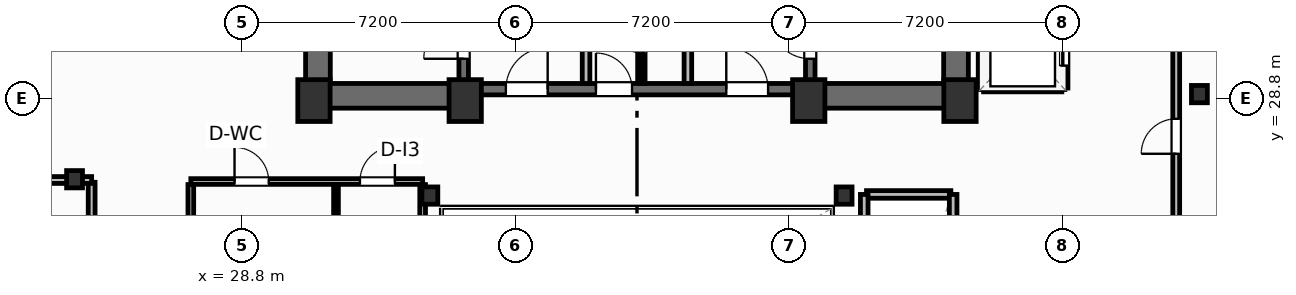
"""IFC4 building model, lengths in metres.
Left out: names, types, materials, properties, quantities, classifications, styles, units other than length and angle.
Written with IfcOpenShell. Run it as: python <this file> out.ifc"""

import sys

from ifc_helpers import new_model, si_unit, direction, frame, frame_2d, origin, origin_2d, place, context, subcontext, project, spatial, rectangle, i_section, extrude, element, fill, save


model = new_model("IFC4")
c1 = context("Model", 3, precision=1e-05, world=origin(), true_north=direction((0.0, 1.0)))
c2 = subcontext(c1, "Body", "Model", "MODEL_VIEW")
j1 = project(units=[si_unit("LENGTHUNIT", "METRE"), si_unit("PLANEANGLEUNIT", "RADIAN")], contexts=[c1])
p1 = place(None, origin())
s1 = spatial("IfcSite", under=j1, at=p1, CompositionType="ELEMENT")
p2 = place(p1, origin())
s2 = spatial("IfcBuilding", under=s1, at=p2, CompositionType="ELEMENT")
p3 = place(p2, frame((0.0, 0.0, 185.7)))
s3 = spatial("IfcBuildingStorey", under=s2, at=p3, CompositionType="ELEMENT", Elevation=185.7)
for number, where, z_axis, x_axis in (
    (1, (30.7, 28.75, 0.0), (0.0, 0.0, 1.0), (1.0, 0.0, 0.0)),
    (2, (34.68, 28.75, 0.0), (0.0, 0.0, 1.0), (1.0, 0.0, 0.0)),
    (3, (43.72, 28.75, 0.0), (0.0, 0.0, 1.0), (1.0, 0.0, 0.0)),
    (4, (47.7, 28.75, 0.0), (0.0, 0.0, 1.0), (1.0, 0.0, 0.0)),
):
    element("IfcColumn", number, at=place(p3, frame(where, z_axis=z_axis, x_axis=x_axis)), inside=s3, PredefinedType="COLUMN", context=c2, shape_type="SweptSolid", body=[
        extrude(rectangle(XDim=0.85, YDim=1.1, at=origin_2d()), origin(), (0.0, 0.0, 1.0), 3.7),
    ])
for number, where, z_axis, x_axis in (
    (5, (33.75, 26.25, 0.0), (0.0, 0.0, 1.0), (1.0, 0.0, 0.0)),
    (6, (44.65, 26.25, 0.0), (0.0, 0.0, 1.0), (1.0, 0.0, 0.0)),
    (7, (24.4, 26.68, 0.0), (0.0, 0.0, 1.0), (1.0, 0.0, 0.0)),
    (8, (54.0, 28.92, 0.0), (0.0, 0.0, 1.0), (1.0, 0.0, 0.0)),
):
    element("IfcColumn", number, at=place(p3, frame(where, z_axis=z_axis, x_axis=x_axis)), inside=s3, PredefinedType="COLUMN", context=c2, shape_type="SweptSolid", body=[
        extrude(i_section(OverallWidth=0.418, OverallDepth=0.455, WebThickness=0.042, FlangeThickness=0.068, FilletRadius=0.025, at=origin_2d()), origin(), (0.0, 0.0, 1.0), 3.7),
    ])
for number, where, z_axis, x_axis in (
    (9, (30.805, 29.2, 0.0), (0.0, 0.0, 1.0), (0.0, 1.0, 0.0)),
    (10, (47.595, 29.2, 0.0), (0.0, 0.0, 1.0), (0.0, 1.0, 0.0)),
):
    element("IfcWall", number, at=place(p3, frame(where, z_axis=z_axis, x_axis=x_axis)), inside=s3, PredefinedType="SHEAR", context=c2, shape_type="SweptSolid", body=[
        extrude(rectangle(XDim=9.22, YDim=0.65, at=frame_2d((4.61, 0.0))), origin(), (0.0, 0.0, 1.0), 3.45),
    ])
p4 = place(p3, frame((30.48, 28.875, 0.0), z_axis=(0.0, 0.0, 1.0), x_axis=(1.0, 0.0, 0.0)))
e11 = element("IfcWall", 11, at=p4, inside=s3, PredefinedType="SHEAR", context=c2, shape_type="SweptSolid", body=[
    extrude(rectangle(XDim=4.32, YDim=0.65, at=frame_2d((2.16, 0.0))), origin(), (0.0, 0.0, 1.0), 3.45),
])
p5 = place(p3, frame((43.6, 28.875, 0.0), z_axis=(0.0, 0.0, 1.0), x_axis=(1.0, 0.0, 0.0)))
e12 = element("IfcWall", 12, at=p5, inside=s3, PredefinedType="SHEAR", context=c2, shape_type="SweptSolid", body=[
    extrude(rectangle(XDim=4.32, YDim=0.65, at=frame_2d((2.16, 0.0))), origin(), (0.0, 0.0, 1.0), 3.45),
])
p6 = place(p3, frame((34.8, 29.05, 0.0), z_axis=(0.0, 0.0, 1.0), x_axis=(1.0, 0.0, 0.0)))
e13 = element("IfcWall", 13, at=p6, inside=s3, PredefinedType="SHEAR", context=c2, shape_type="SweptSolid", body=[
    extrude(rectangle(XDim=8.8, YDim=0.3, at=frame_2d((4.4, 0.0))), origin(), (0.0, 0.0, 1.0), 3.45),
])
p7 = place(p6, frame((0.95, 0.0, 0.0)))
e14 = element("IfcOpeningElement", 14, at=p7, cuts=e13, PredefinedType="OPENING", context=c2, shape_type="SweptSolid", body=[
    extrude(rectangle(XDim=1.1, YDim=2.15, at=frame_2d((0.55, 1.075))), frame((0.0, 0.16, 0.0), z_axis=(0.0, -1.0, 0.0), x_axis=(1.0, 0.0, 0.0)), (0.0, 0.0, 1.0), 0.32),
])
p8 = place(p6, frame((6.75, 0.0, 0.0)))
e15 = element("IfcOpeningElement", 15, at=p8, cuts=e13, PredefinedType="OPENING", context=c2, shape_type="SweptSolid", body=[
    extrude(rectangle(XDim=1.1, YDim=2.15, at=frame_2d((0.55, 1.075))), frame((0.0, 0.16, 0.0), z_axis=(0.0, -1.0, 0.0), x_axis=(1.0, 0.0, 0.0)), (0.0, 0.0, 1.0), 0.32),
])
p9 = place(p6, frame((3.32, 0.0, 0.0)))
e16 = element("IfcOpeningElement", 16, at=p9, cuts=e13, PredefinedType="OPENING", context=c2, shape_type="SweptSolid", body=[
    extrude(rectangle(XDim=0.95, YDim=2.15, at=frame_2d((0.475, 1.075))), frame((0.0, 0.16, 0.0), z_axis=(0.0, -1.0, 0.0), x_axis=(1.0, 0.0, 0.0)), (0.0, 0.0, 1.0), 0.32),
])
p10 = place(p3, frame((34.64, 29.2, 0.0), z_axis=(0.0, 0.0, 1.0), x_axis=(0.0, 1.0, 0.0)))
e17 = element("IfcWall", 17, at=p10, inside=s3, PredefinedType="SHEAR", context=c2, shape_type="SweptSolid", body=[
    extrude(rectangle(XDim=9.22, YDim=0.25, at=frame_2d((4.61, 0.0))), origin(), (0.0, 0.0, 1.0), 3.45),
])
p11 = place(p10, frame((0.65, 0.0, 0.0)))
e18 = element("IfcOpeningElement", 18, at=p11, cuts=e17, PredefinedType="OPENING", context=c2, shape_type="SweptSolid", body=[
    extrude(rectangle(XDim=1.05, YDim=2.15, at=frame_2d((0.525, 1.075))), frame((0.0, 0.135, 0.0), z_axis=(0.0, -1.0, 0.0), x_axis=(1.0, 0.0, 0.0)), (0.0, 0.0, 1.0), 0.27),
])
p12 = place(p3, frame((43.76, 29.2, 0.0), z_axis=(0.0, 0.0, 1.0), x_axis=(0.0, 1.0, 0.0)))
e19 = element("IfcWall", 19, at=p12, inside=s3, PredefinedType="SHEAR", context=c2, shape_type="SweptSolid", body=[
    extrude(rectangle(XDim=9.22, YDim=0.25, at=frame_2d((4.61, 0.0))), origin(), (0.0, 0.0, 1.0), 3.45),
])
p13 = place(p12, frame((0.65, 0.0, 0.0)))
e20 = element("IfcOpeningElement", 20, at=p13, cuts=e19, PredefinedType="OPENING", context=c2, shape_type="SweptSolid", body=[
    extrude(rectangle(XDim=1.05, YDim=2.15, at=frame_2d((0.525, 1.075))), frame((0.0, 0.135, 0.0), z_axis=(0.0, -1.0, 0.0), x_axis=(1.0, 0.0, 0.0)), (0.0, 0.0, 1.0), 0.27),
])
p14 = place(p3, frame((24.85, 23.03, 0.0), z_axis=(0.0, 0.0, 1.0), x_axis=(0.0, 1.0, 0.0)))
e21 = element("IfcWall", 21, at=p14, inside=s3, PredefinedType="PARTITIONING", context=c2, shape_type="SweptSolid", body=[
    extrude(rectangle(XDim=3.57, YDim=0.18, at=frame_2d((1.785, 0.0))), origin(), (0.0, 0.0, 1.0), 3.45),
])
p15 = place(p14, frame((1.5, 0.0, 0.0)))
e22 = element("IfcOpeningElement", 22, at=p15, cuts=e21, PredefinedType="OPENING", context=c2, shape_type="SweptSolid", body=[
    extrude(rectangle(XDim=0.92, YDim=2.05, at=frame_2d((0.46, 1.025))), frame((0.0, 0.1, 0.0), z_axis=(0.0, -1.0, 0.0), x_axis=(1.0, 0.0, 0.0)), (0.0, 0.0, 1.0), 0.2),
])
p16 = place(p3, frame((3.658, 26.66, 0.0), z_axis=(0.0, 0.0, 1.0), x_axis=(1.0, 0.0, 0.0)))
e23 = element("IfcWall", 23, at=p16, inside=s3, PredefinedType="PARTITIONING", context=c2, shape_type="SweptSolid", body=[
    extrude(rectangle(XDim=21.192, YDim=0.18, at=frame_2d((10.596, 0.0))), origin(), (0.0, 0.0, 1.0), 2.662),
])
p17 = place(p3, frame((53.39, 19.28, 0.0), z_axis=(0.0, 0.0, 1.0), x_axis=(0.0, 1.0, 0.0)))
e24 = element("IfcWall", 24, at=p17, inside=s3, PredefinedType="PARTITIONING", context=c2, shape_type="SweptSolid", body=[
    extrude(rectangle(XDim=20.02, YDim=0.18, at=frame_2d((10.01, 0.0))), origin(), (0.0, 0.0, 1.0), 3.45),
])
p18 = place(p17, frame((8.07, 0.0, 0.0)))
e25 = element("IfcOpeningElement", 25, at=p18, cuts=e24, PredefinedType="OPENING", context=c2, shape_type="SweptSolid", body=[
    extrude(rectangle(XDim=0.92, YDim=2.05, at=frame_2d((0.46, 1.025))), frame((0.0, 0.1, 0.0), z_axis=(0.0, -1.0, 0.0), x_axis=(1.0, 0.0, 0.0)), (0.0, 0.0, 1.0), 0.2),
])
for number, where, z_axis, x_axis in (
    (26, (37.86, 29.2, 0.0), (0.0, 0.0, 1.0), (0.0, 1.0, 0.0)),
    (27, (40.54, 29.2, 0.0), (0.0, 0.0, 1.0), (0.0, 1.0, 0.0)),
):
    element("IfcWall", number, at=place(p3, frame(where, z_axis=z_axis, x_axis=x_axis)), inside=s3, PredefinedType="PARTITIONING", context=c2, shape_type="SweptSolid", body=[
        extrude(rectangle(XDim=5.18, YDim=0.2, at=frame_2d((2.59, 0.0))), origin(), (0.0, 0.0, 1.0), 3.45),
    ])
p19 = place(p3, frame((39.35, 29.2, 0.0), z_axis=(0.0, 0.0, 1.0), x_axis=(0.0, 1.0, 0.0)))
e28 = element("IfcWall", 28, at=p19, inside=s3, PredefinedType="PARTITIONING", context=c2, shape_type="SweptSolid", body=[
    extrude(rectangle(XDim=5.22, YDim=0.125, at=frame_2d((2.61, 0.0))), origin(), (0.0, 0.0, 1.0), 3.45),
])
p20 = place(p19, frame((0.8, 0.0, 0.0)))
e29 = element("IfcOpeningElement", 29, at=p20, cuts=e28, PredefinedType="OPENING", context=c2, shape_type="SweptSolid", body=[
    extrude(rectangle(XDim=0.85, YDim=2.05, at=frame_2d((0.425, 1.025))), frame((0.0, 0.073, 0.0), z_axis=(0.0, -1.0, 0.0), x_axis=(1.0, 0.0, 0.0)), (0.0, 0.0, 1.0), 0.145),
])
p21 = place(p19, frame((3.4, 0.0, 0.0)))
e30 = element("IfcOpeningElement", 30, at=p21, cuts=e28, PredefinedType="OPENING", context=c2, shape_type="SweptSolid", body=[
    extrude(rectangle(XDim=0.85, YDim=2.05, at=frame_2d((0.425, 1.025))), frame((0.0, 0.073, 0.0), z_axis=(0.0, -1.0, 0.0), x_axis=(1.0, 0.0, 0.0)), (0.0, 0.0, 1.0), 0.145),
])
p22 = place(p3, frame((27.46, 26.62, 0.0), z_axis=(0.0, 0.0, 1.0), x_axis=(1.0, 0.0, 0.0)))
e31 = element("IfcWall", 31, at=p22, inside=s3, PredefinedType="PARTITIONING", context=c2, shape_type="SweptSolid", body=[
    extrude(rectangle(XDim=6.1, YDim=0.15, at=frame_2d((3.05, 0.0))), origin(), (0.0, 0.0, 1.0), 2.662),
])
p23 = place(p22, frame((1.15, 0.0, 0.0)))
e32 = element("IfcOpeningElement", 32, at=p23, cuts=e31, PredefinedType="OPENING", context=c2, shape_type="SweptSolid", body=[
    extrude(rectangle(XDim=0.9, YDim=2.05, at=frame_2d((0.45, 1.025))), frame((0.0, 0.085, 0.0), z_axis=(0.0, -1.0, 0.0), x_axis=(1.0, 0.0, 0.0)), (0.0, 0.0, 1.0), 0.17),
])
p24 = place(p22, frame((4.45, 0.0, 0.0)))
e33 = element("IfcOpeningElement", 33, at=p24, cuts=e31, PredefinedType="OPENING", context=c2, shape_type="SweptSolid", body=[
    extrude(rectangle(XDim=0.92, YDim=2.05, at=frame_2d((0.46, 1.025))), frame((0.0, 0.085, 0.0), z_axis=(0.0, -1.0, 0.0), x_axis=(1.0, 0.0, 0.0)), (0.0, 0.0, 1.0), 0.17),
])
p25 = place(p3, frame((31.28, 19.38, 0.0), z_axis=(0.0, 0.0, 1.0), x_axis=(0.0, 1.0, 0.0)))
e34 = element("IfcWall", 34, at=p25, inside=s3, PredefinedType="PARTITIONING", context=c2, shape_type="SweptSolid", body=[
    extrude(rectangle(XDim=7.16, YDim=0.125, at=frame_2d((3.58, 0.0))), origin(), (0.0, 0.0, 1.0), 3.45),
])
p26 = place(p3, frame((27.46, 19.38, 0.0), z_axis=(0.0, 0.0, 1.0), x_axis=(0.0, 1.0, 0.0)))
e35 = element("IfcWall", 35, at=p26, inside=s3, PredefinedType="PARTITIONING", context=c2, shape_type="SweptSolid", body=[
    extrude(rectangle(XDim=7.16, YDim=0.15, at=frame_2d((3.58, 0.0))), origin(), (0.0, 0.0, 1.0), 3.45),
])
p27 = place(p26, frame((1.4, 0.0, 0.0)))
e36 = element("IfcOpeningElement", 36, at=p27, cuts=e35, PredefinedType="OPENING", context=c2, shape_type="SweptSolid", body=[
    extrude(rectangle(XDim=0.95, YDim=2.05, at=frame_2d((0.475, 1.025))), frame((0.0, 0.085, 0.0), z_axis=(0.0, -1.0, 0.0), x_axis=(1.0, 0.0, 0.0)), (0.0, 0.0, 1.0), 0.17),
])
p28 = place(p3, frame((33.56, 19.38, 0.0), z_axis=(0.0, 0.0, 1.0), x_axis=(0.0, 1.0, 0.0)))
e37 = element("IfcWall", 37, at=p28, inside=s3, PredefinedType="PARTITIONING", context=c2, shape_type="SweptSolid", body=[
    extrude(rectangle(XDim=7.16, YDim=0.15, at=frame_2d((3.58, 0.0))), origin(), (0.0, 0.0, 1.0), 2.824),
])
p29 = place(p3, frame((48.32, 29.08, 0.0), z_axis=(0.0, 0.0, 1.0), x_axis=(1.0, 0.0, 0.0)))
e38 = element("IfcWall", 38, at=p29, inside=s3, PredefinedType="PARTITIONING", context=c2, shape_type="SweptSolid", body=[
    extrude(rectangle(XDim=2.06, YDim=0.2, at=frame_2d((1.03, 0.0))), origin(), (0.0, 0.0, 1.0), 2.662),
])
p30 = place(p3, frame((48.28, 29.08, 0.0), z_axis=(0.0, 0.0, 1.0), x_axis=(0.0, 1.0, 0.0)))
e39 = element("IfcWall", 39, at=p30, inside=s3, PredefinedType="PARTITIONING", context=c2, shape_type="SweptSolid", body=[
    extrude(rectangle(XDim=6.89, YDim=0.2, at=frame_2d((3.445, 0.0))), origin(), (0.0, 0.0, 1.0), 3.45),
])
p31 = place(p3, frame((50.44, 29.08, 0.0), z_axis=(0.0, 0.0, 1.0), x_axis=(0.0, 1.0, 0.0)))
e40 = element("IfcWall", 40, at=p31, inside=s3, PredefinedType="PARTITIONING", context=c2, shape_type="SweptSolid", body=[
    extrude(rectangle(XDim=6.89, YDim=0.2, at=frame_2d((3.445, 0.0))), origin(), (0.0, 0.0, 1.0), 3.45),
])
p32 = place(p31, frame((0.59, 0.0, 0.0)))
e41 = element("IfcOpeningElement", 41, at=p32, cuts=e40, PredefinedType="OPENING", context=c2, shape_type="SweptSolid", body=[
    extrude(rectangle(XDim=1.1, YDim=2.15, at=frame_2d((0.55, 1.075))), frame((0.0, 0.11, 0.0), z_axis=(0.0, -1.0, 0.0), x_axis=(1.0, 0.0, 0.0)), (0.0, 0.0, 1.0), 0.22),
])
p33 = place(p31, frame((2.89, 0.0, 0.0)))
e42 = element("IfcOpeningElement", 42, at=p33, cuts=e40, PredefinedType="OPENING", context=c2, shape_type="SweptSolid", body=[
    extrude(rectangle(XDim=1.1, YDim=2.15, at=frame_2d((0.55, 1.075))), frame((0.0, 0.11, 0.0), z_axis=(0.0, -1.0, 0.0), x_axis=(1.0, 0.0, 0.0)), (0.0, 0.0, 1.0), 0.22),
])
p34 = place(p31, frame((5.19, 0.0, 0.0)))
e43 = element("IfcOpeningElement", 43, at=p34, cuts=e40, PredefinedType="OPENING", context=c2, shape_type="SweptSolid", body=[
    extrude(rectangle(XDim=1.1, YDim=2.15, at=frame_2d((0.55, 1.075))), frame((0.0, 0.11, 0.0), z_axis=(0.0, -1.0, 0.0), x_axis=(1.0, 0.0, 0.0)), (0.0, 0.0, 1.0), 0.22),
])
p35 = place(p3, frame((45.24, 26.28, 0.0), z_axis=(0.0, 0.0, 1.0), x_axis=(1.0, 0.0, 0.0)))
e44 = element("IfcWall", 44, at=p35, inside=s3, PredefinedType="PARTITIONING", context=c2, shape_type="SweptSolid", body=[
    extrude(rectangle(XDim=2.22, YDim=0.2, at=frame_2d((1.11, 0.0))), origin(), (0.0, 0.0, 1.0), 3.45),
])
for number, where, z_axis, x_axis in (
    (45, (45.18, 19.38, 0.0), (0.0, 0.0, 1.0), (0.0, 1.0, 0.0)),
    (46, (47.52, 19.38, 0.0), (0.0, 0.0, 1.0), (0.0, 1.0, 0.0)),
):
    element("IfcWall", number, at=place(p3, frame(where, z_axis=z_axis, x_axis=x_axis)), inside=s3, PredefinedType="PARTITIONING", context=c2, shape_type="SweptSolid", body=[
        extrude(rectangle(XDim=6.9, YDim=0.2, at=frame_2d((3.45, 0.0))), origin(), (0.0, 0.0, 1.0), 3.45),
    ])
p36 = place(p18, origin())
e47 = element("IfcDoor", 47, at=p36, inside=s3, OperationType="SINGLE_SWING_LEFT", PredefinedType="DOOR", context=c2, shape_type="SweptSolid", body=[
    extrude(rectangle(XDim=0.92, YDim=2.05, at=frame_2d((0.46, 1.025))), frame((0.0, 0.025, 0.0), z_axis=(0.0, -1.0, 0.0), x_axis=(1.0, 0.0, 0.0)), (0.0, 0.0, 1.0), 0.05),
])
fill(e25, e47)
p37 = place(p11, origin())
e48 = element("IfcDoor", 48, at=p37, inside=s3, OperationType="SINGLE_SWING_LEFT", PredefinedType="DOOR", context=c2, shape_type="SweptSolid", body=[
    extrude(rectangle(XDim=1.05, YDim=2.15, at=frame_2d((0.525, 1.075))), frame((0.0, 0.025, 0.0), z_axis=(0.0, -1.0, 0.0), x_axis=(1.0, 0.0, 0.0)), (0.0, 0.0, 1.0), 0.05),
])
fill(e18, e48)
p38 = place(p13, origin())
e49 = element("IfcDoor", 49, at=p38, inside=s3, OperationType="SINGLE_SWING_RIGHT", PredefinedType="DOOR", context=c2, shape_type="SweptSolid", body=[
    extrude(rectangle(XDim=1.05, YDim=2.15, at=frame_2d((0.525, 1.075))), frame((0.0, 0.025, 0.0), z_axis=(0.0, -1.0, 0.0), x_axis=(1.0, 0.0, 0.0)), (0.0, 0.0, 1.0), 0.05),
])
fill(e20, e49)
p39 = place(p7, origin())
e50 = element("IfcDoor", 50, at=p39, inside=s3, OperationType="SINGLE_SWING_RIGHT", PredefinedType="DOOR", context=c2, shape_type="SweptSolid", body=[
    extrude(rectangle(XDim=1.1, YDim=2.15, at=frame_2d((0.55, 1.075))), frame((0.0, 0.025, 0.0), z_axis=(0.0, -1.0, 0.0), x_axis=(1.0, 0.0, 0.0)), (0.0, 0.0, 1.0), 0.05),
])
fill(e14, e50)
p40 = place(p8, origin())
e51 = element("IfcDoor", 51, at=p40, inside=s3, OperationType="SINGLE_SWING_LEFT", PredefinedType="DOOR", context=c2, shape_type="SweptSolid", body=[
    extrude(rectangle(XDim=1.1, YDim=2.15, at=frame_2d((0.55, 1.075))), frame((0.0, 0.025, 0.0), z_axis=(0.0, -1.0, 0.0), x_axis=(1.0, 0.0, 0.0)), (0.0, 0.0, 1.0), 0.05),
])
fill(e15, e51)
p41 = place(p20, origin())
e52 = element("IfcDoor", 52, at=p41, inside=s3, OperationType="SINGLE_SWING_RIGHT", PredefinedType="DOOR", context=c2, shape_type="SweptSolid", body=[
    extrude(rectangle(XDim=0.85, YDim=2.05, at=frame_2d((0.425, 1.025))), frame((0.0, 0.025, 0.0), z_axis=(0.0, -1.0, 0.0), x_axis=(1.0, 0.0, 0.0)), (0.0, 0.0, 1.0), 0.05),
])
fill(e29, e52)
p42 = place(p9, origin())
e53 = element("IfcDoor", 53, at=p42, inside=s3, OperationType="SINGLE_SWING_LEFT", PredefinedType="DOOR", context=c2, shape_type="SweptSolid", body=[
    extrude(rectangle(XDim=0.95, YDim=2.15, at=frame_2d((0.475, 1.075))), frame((0.0, 0.025, 0.0), z_axis=(0.0, -1.0, 0.0), x_axis=(1.0, 0.0, 0.0)), (0.0, 0.0, 1.0), 0.05),
])
fill(e16, e53)
p43 = place(p23, origin())
e54 = element("IfcDoor", 54, at=p43, inside=s3, OperationType="SINGLE_SWING_LEFT", PredefinedType="DOOR", context=c2, shape_type="SweptSolid", body=[
    extrude(rectangle(XDim=0.9, YDim=2.05, at=frame_2d((0.45, 1.025))), frame((0.0, 0.025, 0.0), z_axis=(0.0, -1.0, 0.0), x_axis=(1.0, 0.0, 0.0)), (0.0, 0.0, 1.0), 0.05),
])
fill(e32, e54)
p44 = place(p24, origin())
e55 = element("IfcDoor", 55, at=p44, inside=s3, OperationType="SINGLE_SWING_RIGHT", PredefinedType="DOOR", context=c2, shape_type="SweptSolid", body=[
    extrude(rectangle(XDim=0.92, YDim=2.05, at=frame_2d((0.46, 1.025))), frame((0.0, 0.025, 0.0), z_axis=(0.0, -1.0, 0.0), x_axis=(1.0, 0.0, 0.0)), (0.0, 0.0, 1.0), 0.05),
])
fill(e33, e55)
p45 = place(p32, origin())
e56 = element("IfcDoor", 56, at=p45, inside=s3, OperationType="SLIDING_TO_LEFT", PredefinedType="DOOR", context=c2, shape_type="SweptSolid", body=[
    extrude(rectangle(XDim=1.1, YDim=2.15, at=frame_2d((0.55, 1.075))), frame((0.0, 0.025, 0.0), z_axis=(0.0, -1.0, 0.0), x_axis=(1.0, 0.0, 0.0)), (0.0, 0.0, 1.0), 0.05),
])
fill(e41, e56)
save(model, sys.argv[1])
